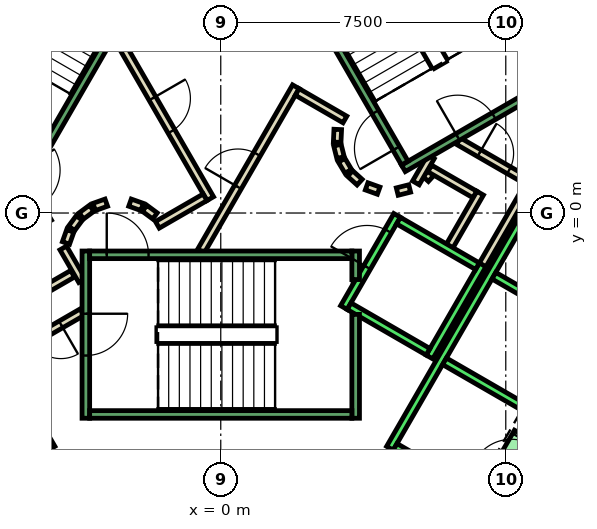
"""IFC4 building model, lengths in metres.
Left out: names, types, materials, properties, quantities, classifications, styles, units other than length and angle.
Written with IfcOpenShell. Run it as: python <this file> out.ifc"""

import sys

from ifc_helpers import new_model, si_unit, direction, frame, frame_2d, origin, place, context, subcontext, project, spatial, polyline, rectangle, outline, extrude, element, fill, save


model = new_model("IFC4")
c1 = context("Model", 3, precision=1e-05, world=origin(), true_north=direction((0.0, 1.0)))
c2 = subcontext(c1, "Body", "Model", "MODEL_VIEW")
j1 = project(units=[si_unit("LENGTHUNIT", "METRE"), si_unit("PLANEANGLEUNIT", "RADIAN")], contexts=[c1])
p1 = place(None, origin())
s1 = spatial("IfcSite", under=j1, at=p1, CompositionType="ELEMENT")
p2 = place(p1, origin())
s2 = spatial("IfcBuilding", under=s1, at=p2, CompositionType="ELEMENT")
p3 = place(p2, frame((0.0, 0.0, 68.6)))
s3 = spatial("IfcBuildingStorey", under=s2, at=p3, CompositionType="ELEMENT", Elevation=68.6)
p4 = place(p3, frame((0.0, 0.0, -0.4)))
e1 = element("IfcWall", 1, at=p4, inside=s3, PredefinedType="SHEAR", context=c2, shape_type="SweptSolid", body=[
    extrude(outline(polyline([(8.517, 11.748), (7.651, 11.248), (12.702, 2.5), (13.856, 2.5), (8.517, 11.748)])), origin(), (0.0, 0.0, 1.0), 4.2),
])
p5 = place(p3, frame((0.0, 0.0, 3.6)))
e2 = element("IfcWall", 2, at=p5, inside=s3, PredefinedType="SHEAR", context=c2, shape_type="SweptSolid", body=[
    extrude(outline(polyline([(8.767, -6.314), (7.902, -5.814), (7.252, -6.94), (8.117, -7.44), (8.767, -6.314)])), origin(), (0.0, 0.0, 1.0), 0.2),
])
p6 = place(p3, frame((5.39, 0.898, 0.0), z_axis=(0.0, 0.0, 1.0), x_axis=(0.673828488714, 0.738887791073, 0.0)))
e3 = element("IfcWall", 3, at=p6, inside=s3, PredefinedType="PARTITIONING", context=c2, shape_type="SweptSolid", body=[
    extrude(rectangle(XDim=0.263, YDim=0.2, at=frame_2d((0.131, 0.0))), origin(), (0.0, 0.0, 1.0), 3.8),
])
p7 = place(p3, frame((5.499, 1.172, 0.0), z_axis=(0.0, 0.0, 1.0), x_axis=(0.866333505267, -0.499465972466, 0.0)))
e4 = element("IfcWall", 4, at=p7, inside=s3, PredefinedType="PARTITIONING", context=c2, shape_type="SweptSolid", body=[
    extrude(rectangle(XDim=1.374, YDim=0.2, at=frame_2d((0.687, 0.0))), origin(), (0.0, 0.0, 1.0), 3.8),
])
p8 = place(p3, frame((6.826, 0.522, 0.0), z_axis=(0.0, 0.0, 1.0), x_axis=(-0.500016722714, -0.866015748706, 0.0)))
e5 = element("IfcWall", 5, at=p8, inside=s3, PredefinedType="PARTITIONING", context=c2, shape_type="SweptSolid", body=[
    extrude(rectangle(XDim=1.7, YDim=0.2, at=frame_2d((0.85, 0.0))), origin(), (0.0, 0.0, 1.0), 3.8),
])
p9 = place(p3, frame((6.25, 1.894, 0.0), z_axis=(0.0, 0.0, 1.0), x_axis=(0.866043184279, -0.499969202016, 0.0)))
e6 = element("IfcWall", 6, at=p9, inside=s3, PredefinedType="PARTITIONING", context=c2, shape_type="SweptSolid", body=[
    extrude(rectangle(XDim=2.084, YDim=0.2, at=frame_2d((1.042, 0.0))), origin(), (0.0, 0.0, 1.0), 3.8),
])
p10 = place(p9, frame((0.642, 0.0, 0.0)))
e7 = element("IfcOpeningElement", 7, at=p10, cuts=e6, PredefinedType="OPENING", context=c2, shape_type="SweptSolid", body=[
    extrude(rectangle(XDim=0.9, YDim=2.1, at=frame_2d((0.45, 1.05))), frame((0.0, 0.11, 0.0), z_axis=(0.0, -1.0, 0.0), x_axis=(1.0, 0.0, 0.0)), (0.0, 0.0, 1.0), 0.22),
])
p11 = place(p3, frame((8.192, 0.888, 0.0), z_axis=(0.0, 0.0, 1.0), x_axis=(-0.499940625693, -0.866059680843, 0.0)))
e8 = element("IfcWall", 8, at=p11, inside=s3, PredefinedType="PARTITIONING", context=c2, shape_type="SweptSolid", body=[
    extrude(rectangle(XDim=2.68, YDim=0.2, at=frame_2d((1.34, 0.0))), origin(), (0.0, 0.0, 1.0), 3.8),
])
p12 = place(p3, frame((5.135, 0.793, 0.0), z_axis=(0.0, 0.0, 1.0), x_axis=(0.499526442893, 0.866298639529, 0.0)))
e9 = element("IfcWall", 9, at=p12, inside=s3, PredefinedType="PARTITIONING", context=c2, shape_type="SweptSolid", body=[
    extrude(rectangle(XDim=0.791, YDim=0.2, at=frame_2d((0.396, 0.0))), origin(), (0.0, 0.0, 1.0), 3.8),
])
p13 = place(p3, frame((-3.9, -1.599, 0.0), z_axis=(0.0, 0.0, 1.0), x_axis=(-0.865969445389, -0.500096910261, 0.0)))
e10 = element("IfcWall", 10, at=p13, inside=s3, PredefinedType="PARTITIONING", context=c2, shape_type="SweptSolid", body=[
    extrude(rectangle(XDim=1.373, YDim=0.2, at=frame_2d((0.687, 0.0))), origin(), (0.0, 0.0, 1.0), 3.8),
])
p14 = place(p3, frame((-3.65, -2.61, 0.0), z_axis=(0.0, 0.0, 1.0), x_axis=(-0.866072462134, -0.499918483688, 0.0)))
e11 = element("IfcWall", 11, at=p14, inside=s3, PredefinedType="PARTITIONING", context=c2, shape_type="SweptSolid", body=[
    extrude(rectangle(XDim=2.084, YDim=0.2, at=frame_2d((1.042, 0.0))), origin(), (0.0, 0.0, 1.0), 3.8),
])
p15 = place(p14, frame((0.642, 0.0, 0.0)))
e12 = element("IfcOpeningElement", 12, at=p15, cuts=e11, PredefinedType="OPENING", context=c2, shape_type="SweptSolid", body=[
    extrude(rectangle(XDim=0.9, YDim=2.1, at=frame_2d((0.45, 1.05))), frame((0.0, 0.11, 0.0), z_axis=(0.0, -1.0, 0.0), x_axis=(1.0, 0.0, 0.0)), (0.0, 0.0, 1.0), 0.22),
])
p16 = place(p3, frame((-4.145, -0.92, 0.0), z_axis=(0.0, 0.0, 1.0), x_axis=(0.499743786207, -0.866173278362, 0.0)))
e13 = element("IfcWall", 13, at=p16, inside=s3, PredefinedType="PARTITIONING", context=c2, shape_type="SweptSolid", body=[
    extrude(rectangle(XDim=0.991, YDim=0.2, at=frame_2d((0.495, 0.0))), origin(), (0.0, 0.0, 1.0), 3.8),
])
p17 = place(p3, frame((-0.52, -1.0, 0.0), z_axis=(0.0, 0.0, 1.0), x_axis=(0.50011622646, 0.865958290007, 0.0)))
e14 = element("IfcWall", 14, at=p17, inside=s3, PredefinedType="PARTITIONING", context=c2, shape_type="SweptSolid", body=[
    extrude(rectangle(XDim=4.991, YDim=0.2, at=frame_2d((2.496, 0.0))), origin(), (0.0, 0.0, 1.0), 3.8),
])
p18 = place(p17, frame((1.945, 0.0, 0.0)))
e15 = element("IfcOpeningElement", 15, at=p18, cuts=e14, PredefinedType="OPENING", context=c2, shape_type="SweptSolid", body=[
    extrude(rectangle(XDim=1.0, YDim=2.1, at=frame_2d((0.5, 1.05))), frame((0.0, 0.11, 0.0), z_axis=(0.0, -1.0, 0.0), x_axis=(1.0, 0.0, 0.0)), (0.0, 0.0, 1.0), 0.22),
])
p19 = place(p3, frame((2.012, 3.186, 0.0), z_axis=(0.0, 0.0, 1.0), x_axis=(0.865891012941, -0.500232699559, 0.0)))
e16 = element("IfcWall", 16, at=p19, inside=s3, PredefinedType="PARTITIONING", context=c2, shape_type="SweptSolid", body=[
    extrude(rectangle(XDim=1.449, YDim=0.2, at=frame_2d((0.725, 0.0))), origin(), (0.0, 0.0, 1.0), 3.8),
])
p20 = place(p3, frame((3.079, 2.199, 0.0), z_axis=(0.0, 0.0, 1.0), x_axis=(-0.047771483479, -0.998858290933, 0.0)))
e17 = element("IfcWall", 17, at=p20, inside=s3, PredefinedType="PARTITIONING", context=c2, shape_type="SweptSolid", body=[
    extrude(rectangle(XDim=0.337, YDim=0.2, at=frame_2d((0.169, 0.0))), origin(), (0.0, 0.0, 1.0), 3.8),
])
p21 = place(p3, frame((3.07, 1.786, 0.0), z_axis=(0.0, 0.0, 1.0), x_axis=(0.242705583207, -0.970099994784, 0.0)))
e18 = element("IfcWall", 18, at=p21, inside=s3, PredefinedType="PARTITIONING", context=c2, shape_type="SweptSolid", body=[
    extrude(rectangle(XDim=0.338, YDim=0.2, at=frame_2d((0.169, 0.0))), origin(), (0.0, 0.0, 1.0), 3.8),
])
for number, where, z_axis, x_axis in (
    (19, (3.182, 1.388, 0.0), (0.0, 0.0, 1.0), (0.512, -0.859, 0.0)),
    (20, (3.404, 1.039, 0.0), (0.0, 0.0, 1.0), (0.74, -0.672, 0.0)),
):
    element("IfcWall", number, at=place(p3, frame(where, z_axis=z_axis, x_axis=x_axis)), inside=s3, PredefinedType="PARTITIONING", context=c2, shape_type="SweptSolid", body=[
        extrude(rectangle(XDim=0.338, YDim=0.2, at=frame_2d((0.169, 0.0))), origin(), (0.0, 0.0, 1.0), 3.8),
    ])
p22 = place(p3, frame((3.838, 0.702, 0.0), z_axis=(0.0, 0.0, 1.0), x_axis=(0.941035081519, -0.338308993895, 0.0)))
e21 = element("IfcWall", 21, at=p22, inside=s3, PredefinedType="PARTITIONING", context=c2, shape_type="SweptSolid", body=[
    extrude(rectangle(XDim=0.337, YDim=0.2, at=frame_2d((0.168, 0.0))), origin(), (0.0, 0.0, 1.0), 3.8),
])
p23 = place(p3, frame((4.644, 0.564, 0.0), z_axis=(0.0, 0.0, 1.0), x_axis=(0.969929076366, 0.243387729394, 0.0)))
e22 = element("IfcWall", 22, at=p23, inside=s3, PredefinedType="PARTITIONING", context=c2, shape_type="SweptSolid", body=[
    extrude(rectangle(XDim=0.337, YDim=0.2, at=frame_2d((0.168, 0.0))), origin(), (0.0, 0.0, 1.0), 3.8),
])
p24 = place(p3, frame((-2.771, 4.7, 0.0), z_axis=(0.0, 0.0, 1.0), x_axis=(0.499969479948, -0.866043023828, 0.0)))
e23 = element("IfcWall", 23, at=p24, inside=s3, PredefinedType="PARTITIONING", context=c2, shape_type="SweptSolid", body=[
    extrude(rectangle(XDim=4.99, YDim=0.2, at=frame_2d((2.495, 0.0))), origin(), (0.0, 0.0, 1.0), 3.8),
])
p25 = place(p24, frame((1.945, 0.0, 0.0)))
e24 = element("IfcOpeningElement", 24, at=p25, cuts=e23, PredefinedType="OPENING", context=c2, shape_type="SweptSolid", body=[
    extrude(rectangle(XDim=1.0, YDim=2.1, at=frame_2d((0.5, 1.05))), frame((0.0, 0.11, 0.0), z_axis=(0.0, -1.0, 0.0), x_axis=(1.0, 0.0, 0.0)), (0.0, 0.0, 1.0), 0.22),
])
p26 = place(p3, frame((-0.412, 0.414, 0.0), z_axis=(0.0, 0.0, 1.0), x_axis=(-0.866017369001, -0.500013916395, 0.0)))
e25 = element("IfcWall", 25, at=p26, inside=s3, PredefinedType="PARTITIONING", context=c2, shape_type="SweptSolid", body=[
    extrude(rectangle(XDim=1.45, YDim=0.2, at=frame_2d((0.725, 0.0))), origin(), (0.0, 0.0, 1.0), 3.8),
])
p27 = place(p3, frame((-1.731, -0.077, 0.0), z_axis=(0.0, 0.0, 1.0), x_axis=(-0.804311165252, 0.594208338422, 0.0)))
e26 = element("IfcWall", 26, at=p27, inside=s3, PredefinedType="PARTITIONING", context=c2, shape_type="SweptSolid", body=[
    extrude(rectangle(XDim=0.338, YDim=0.2, at=frame_2d((0.169, 0.0))), origin(), (0.0, 0.0, 1.0), 3.8),
])
p28 = place(p3, frame((-2.07, 0.16, 0.0), z_axis=(0.0, 0.0, 1.0), x_axis=(-0.942199461132, 0.335052496547, 0.0)))
e27 = element("IfcWall", 27, at=p28, inside=s3, PredefinedType="PARTITIONING", context=c2, shape_type="SweptSolid", body=[
    extrude(rectangle(XDim=0.337, YDim=0.2, at=frame_2d((0.169, 0.0))), origin(), (0.0, 0.0, 1.0), 3.8),
])
p29 = place(p3, frame((-3.012, 0.273, 0.0), z_axis=(0.0, 0.0, 1.0), x_axis=(-0.942280615813, -0.334824194261, 0.0)))
e28 = element("IfcWall", 28, at=p29, inside=s3, PredefinedType="PARTITIONING", context=c2, shape_type="SweptSolid", body=[
    extrude(rectangle(XDim=0.338, YDim=0.2, at=frame_2d((0.169, 0.0))), origin(), (0.0, 0.0, 1.0), 3.8),
])
p30 = place(p3, frame((-3.397, 0.124, 0.0), z_axis=(0.0, 0.0, 1.0), x_axis=(-0.804311165252, -0.594208338422, 0.0)))
e29 = element("IfcWall", 29, at=p30, inside=s3, PredefinedType="PARTITIONING", context=c2, shape_type="SweptSolid", body=[
    extrude(rectangle(XDim=0.338, YDim=0.2, at=frame_2d((0.169, 0.0))), origin(), (0.0, 0.0, 1.0), 3.8),
])
p31 = place(p3, frame((-3.723, -0.131, 0.0), z_axis=(0.0, 0.0, 1.0), x_axis=(-0.594675113454, -0.803966112121, 0.0)))
e30 = element("IfcWall", 30, at=p31, inside=s3, PredefinedType="PARTITIONING", context=c2, shape_type="SweptSolid", body=[
    extrude(rectangle(XDim=0.338, YDim=0.2, at=frame_2d((0.169, 0.0))), origin(), (0.0, 0.0, 1.0), 3.8),
])
p32 = place(p3, frame((-3.96, -0.47, 0.0), z_axis=(0.0, 0.0, 1.0), x_axis=(-0.334824194261, -0.942280615813, 0.0)))
e31 = element("IfcWall", 31, at=p32, inside=s3, PredefinedType="PARTITIONING", context=c2, shape_type="SweptSolid", body=[
    extrude(rectangle(XDim=0.338, YDim=0.2, at=frame_2d((0.169, 0.0))), origin(), (0.0, 0.0, 1.0), 3.8),
])
p33 = place(p3, frame((-9.751, 2.99, 0.0), z_axis=(0.0, 0.0, 1.0), x_axis=(0.50000090737, -0.866024879913, 0.0)))
e32 = element("IfcWall", 32, at=p33, inside=s3, PredefinedType="STANDARD", context=c2, shape_type="SweptSolid", body=[
    extrude(rectangle(XDim=10.6, YDim=0.2, at=frame_2d((5.3, 0.0))), origin(), (0.0, 0.0, 1.0), 3.8),
])
p34 = place(p3, frame((3.24, -2.488, 0.0), z_axis=(0.0, 0.0, 1.0), x_axis=(0.49994636267, 0.866056369097, 0.0)))
e33 = element("IfcWall", 33, at=p34, inside=s3, PredefinedType="STANDARD", context=c2, shape_type="SweptSolid", body=[
    extrude(rectangle(XDim=2.8, YDim=0.2, at=frame_2d((1.4, 0.0))), origin(), (0.0, 0.0, 1.0), 3.8),
])
p35 = place(p34, frame((1.225, 0.0, 0.0)))
e34 = element("IfcOpeningElement", 34, at=p35, cuts=e33, PredefinedType="OPENING", context=c2, shape_type="SweptSolid", body=[
    extrude(rectangle(XDim=1.1, YDim=2.1, at=frame_2d((0.55, 1.05))), frame((0.0, 0.11, 0.0), z_axis=(0.0, -1.0, 0.0), x_axis=(1.0, 0.0, 0.0)), (0.0, 0.0, 1.0), 0.22),
])
p36 = place(p3, frame((5.492, -3.788, 0.0), z_axis=(0.0, 0.0, 1.0), x_axis=(0.500011755427, 0.866018616679, 0.0)))
e35 = element("IfcWall", 35, at=p36, inside=s3, PredefinedType="STANDARD", context=c2, shape_type="SweptSolid", body=[
    extrude(rectangle(XDim=2.8, YDim=0.2, at=frame_2d((1.4, 0.0))), origin(), (0.0, 0.0, 1.0), 3.8),
])
p37 = place(p3, frame((3.377, -2.452, 0.0), z_axis=(0.0, 0.0, 1.0), x_axis=(0.865955154139, -0.50012165622, 0.0)))
e36 = element("IfcWall", 36, at=p37, inside=s3, PredefinedType="STANDARD", context=c2, shape_type="SweptSolid", body=[
    extrude(rectangle(XDim=2.4, YDim=0.2, at=frame_2d((1.2, 0.0))), origin(), (0.0, 0.0, 1.0), 3.8),
])
p38 = place(p3, frame((4.677, -0.2, 0.0), z_axis=(0.0, 0.0, 1.0), x_axis=(0.865973769406, -0.500089422704, 0.0)))
e37 = element("IfcWall", 37, at=p38, inside=s3, PredefinedType="STANDARD", context=c2, shape_type="SweptSolid", body=[
    extrude(rectangle(XDim=2.399, YDim=0.2, at=frame_2d((1.2, 0.0))), origin(), (0.0, 0.0, 1.0), 3.8),
])
p39 = place(p3, frame((4.451, -6.19, 0.0), z_axis=(0.0, 0.0, 1.0), x_axis=(0.50000090737, 0.866024879913, 0.0)))
e38 = element("IfcWall", 38, at=p39, inside=s3, PredefinedType="STANDARD", context=c2, shape_type="SweptSolid", body=[
    extrude(rectangle(XDim=10.6, YDim=0.2, at=frame_2d((5.3, 0.0))), origin(), (0.0, 0.0, 1.0), 3.8),
])
for number, where, z_axis, x_axis in (
    (39, (4.588, -6.153, 0.0), (0.0, 0.0, 1.0), (0.866, -0.5, 0.0)),
    (40, (5.888, -3.902, 0.0), (0.0, 0.0, 1.0), (0.866, -0.5, 0.0)),
    (41, (7.188, -1.65, 0.0), (0.0, 0.0, 1.0), (0.866, -0.5, 0.0)),
):
    element("IfcWall", number, at=place(p3, frame(where, z_axis=z_axis, x_axis=x_axis)), inside=s3, PredefinedType="STANDARD", context=c2, shape_type="SweptSolid", body=[
        extrude(rectangle(XDim=2.5, YDim=0.2, at=frame_2d((1.25, 0.0))), origin(), (0.0, 0.0, 1.0), 3.8),
    ])
p40 = place(p3, frame((7.598, -7.14, 0.0), z_axis=(0.0, 0.0, 1.0), x_axis=(0.500362116554, 0.865816234728, 0.0)))
e42 = element("IfcWall", 42, at=p40, inside=s3, PredefinedType="STANDARD", context=c2, shape_type="SweptSolid", body=[
    extrude(rectangle(XDim=1.299, YDim=1.2, at=frame_2d((0.65, 0.0))), origin(), (0.0, 0.0, 1.0), 2.4),
])
p41 = place(p40, frame((0.1, 0.0, 0.0)))
e43 = element("IfcOpeningElement", 43, at=p41, cuts=e42, PredefinedType="OPENING", context=c2, shape_type="SweptSolid", body=[
    extrude(rectangle(XDim=1.1, YDim=2.3, at=frame_2d((0.55, 1.15))), frame((0.0, 0.61, 0.0), z_axis=(0.0, -1.0, 0.0), x_axis=(1.0, 0.0, 0.0)), (0.0, 0.0, 1.0), 1.22),
])
p42 = place(p3, frame((-3.55, -1.0, 0.0), z_axis=(0.0, 0.0, 1.0), x_axis=(0.0, -1.0, 0.0)))
e44 = element("IfcWall", 44, at=p42, inside=s3, PredefinedType="STANDARD", context=c2, shape_type="SweptSolid", body=[
    extrude(rectangle(XDim=4.4, YDim=0.2, at=frame_2d((2.2, 0.0))), origin(), (0.0, 0.0, 1.0), 3.8),
])
p43 = place(p42, frame((1.65, 0.0, 0.0)))
e45 = element("IfcOpeningElement", 45, at=p43, cuts=e44, PredefinedType="OPENING", context=c2, shape_type="SweptSolid", body=[
    extrude(rectangle(XDim=1.1, YDim=2.2, at=frame_2d((0.55, 1.1))), frame((0.0, 0.11, 0.0), z_axis=(0.0, -1.0, 0.0), x_axis=(1.0, 0.0, 0.0)), (0.0, 0.0, 1.0), 0.22),
])
p44 = place(p3, frame((3.55, -2.667, 0.0), z_axis=(0.0, 0.0, 1.0), x_axis=(0.0, -1.0, 0.0)))
e46 = element("IfcWall", 46, at=p44, inside=s3, PredefinedType="STANDARD", context=c2, shape_type="SweptSolid", body=[
    extrude(rectangle(XDim=2.733, YDim=0.2, at=frame_2d((1.366, 0.0))), origin(), (0.0, 0.0, 1.0), 3.8),
])
p45 = place(p3, frame((3.55, -1.0, 0.0), z_axis=(0.0, 0.0, 1.0), x_axis=(0.0, -1.0, 0.0)))
e47 = element("IfcWall", 47, at=p45, inside=s3, PredefinedType="STANDARD", context=c2, shape_type="SweptSolid", body=[
    extrude(rectangle(XDim=0.751, YDim=0.2, at=frame_2d((0.375, 0.0))), origin(), (0.0, 0.0, 1.0), 3.8),
])
p46 = place(p3, frame((-3.45, -1.1, 0.0), z_axis=(0.0, 0.0, 1.0), x_axis=(1.0, 0.0, 0.0)))
e48 = element("IfcWall", 48, at=p46, inside=s3, PredefinedType="STANDARD", context=c2, shape_type="SweptSolid", body=[
    extrude(rectangle(XDim=6.9, YDim=0.2, at=frame_2d((3.45, 0.0))), origin(), (0.0, 0.0, 1.0), 3.8),
])
p47 = place(p46, frame((0.45, 0.0, 0.0)))
e49 = element("IfcOpeningElement", 49, at=p47, cuts=e48, PredefinedType="OPENING", context=c2, shape_type="SweptSolid", body=[
    extrude(rectangle(XDim=1.1, YDim=2.2, at=frame_2d((0.55, 1.1))), frame((0.0, 0.11, 0.0), z_axis=(0.0, -1.0, 0.0), x_axis=(1.0, 0.0, 0.0)), (0.0, 0.0, 1.0), 0.22),
])
p48 = place(p3, frame((-3.45, -5.3, 0.0), z_axis=(0.0, 0.0, 1.0), x_axis=(1.0, 0.0, 0.0)))
e50 = element("IfcWall", 50, at=p48, inside=s3, PredefinedType="STANDARD", context=c2, shape_type="SweptSolid", body=[
    extrude(rectangle(XDim=6.9, YDim=0.2, at=frame_2d((3.45, 0.0))), origin(), (0.0, 0.0, 1.0), 3.8),
])
p49 = place(p3, frame((4.806, 1.176, 0.0), z_axis=(0.0, 0.0, 1.0), x_axis=(0.866059941101, 0.499940174841, 0.0)))
e51 = element("IfcWall", 51, at=p49, inside=s3, PredefinedType="STANDARD", context=c2, shape_type="SweptSolid", body=[
    extrude(rectangle(XDim=4.4, YDim=0.2, at=frame_2d((2.2, 0.0))), origin(), (0.0, 0.0, 1.0), 3.8),
])
p50 = place(p49, frame((1.65, 0.0, 0.0)))
e52 = element("IfcOpeningElement", 52, at=p50, cuts=e51, PredefinedType="OPENING", context=c2, shape_type="SweptSolid", body=[
    extrude(rectangle(XDim=1.1, YDim=2.2, at=frame_2d((0.55, 1.1))), frame((0.0, 0.11, 0.0), z_axis=(0.0, -1.0, 0.0), x_axis=(1.0, 0.0, 0.0)), (0.0, 0.0, 1.0), 0.22),
])
p51 = place(p3, frame((4.843, 1.312, 0.0), z_axis=(0.0, 0.0, 1.0), x_axis=(-0.499963383562, 0.866046543262, 0.0)))
e53 = element("IfcWall", 53, at=p51, inside=s3, PredefinedType="STANDARD", context=c2, shape_type="SweptSolid", body=[
    extrude(rectangle(XDim=6.9, YDim=0.2, at=frame_2d((3.45, 0.0))), origin(), (0.0, 0.0, 1.0), 3.8),
])
p52 = place(p51, frame((0.45, 0.0, 0.0)))
e54 = element("IfcOpeningElement", 54, at=p52, cuts=e53, PredefinedType="OPENING", context=c2, shape_type="SweptSolid", body=[
    extrude(rectangle(XDim=1.1, YDim=2.2, at=frame_2d((0.55, 1.1))), frame((0.0, 0.11, 0.0), z_axis=(0.0, -1.0, 0.0), x_axis=(1.0, 0.0, 0.0)), (0.0, 0.0, 1.0), 0.22),
])
p53 = place(p3, frame((8.48, 3.412, 0.0), z_axis=(0.0, 0.0, 1.0), x_axis=(-0.499978703459, 0.866037698999, 0.0)))
e55 = element("IfcWall", 55, at=p53, inside=s3, PredefinedType="STANDARD", context=c2, shape_type="SweptSolid", body=[
    extrude(rectangle(XDim=6.9, YDim=0.2, at=frame_2d((3.45, 0.0))), origin(), (0.0, 0.0, 1.0), 3.8),
])
p54 = place(p3, frame((-1.393, 7.288, 0.0), z_axis=(0.0, 0.0, 1.0), x_axis=(-0.499963383562, -0.866046543262, 0.0)))
e56 = element("IfcWall", 56, at=p54, inside=s3, PredefinedType="STANDARD", context=c2, shape_type="SweptSolid", body=[
    extrude(rectangle(XDim=6.9, YDim=0.2, at=frame_2d((3.45, 0.0))), origin(), (0.0, 0.0, 1.0), 3.8),
])
p55 = place(p54, frame((0.45, 0.0, 0.0)))
e57 = element("IfcOpeningElement", 57, at=p55, cuts=e56, PredefinedType="OPENING", context=c2, shape_type="SweptSolid", body=[
    extrude(rectangle(XDim=1.1, YDim=2.2, at=frame_2d((0.55, 1.1))), frame((0.0, 0.11, 0.0), z_axis=(0.0, -1.0, 0.0), x_axis=(1.0, 0.0, 0.0)), (0.0, 0.0, 1.0), 0.22),
])
p56 = place(p18, origin())
e58 = element("IfcDoor", 58, at=p56, inside=s3, OperationType="SINGLE_SWING_LEFT", PredefinedType="DOOR", context=c2, shape_type="SweptSolid", body=[
    extrude(rectangle(XDim=1.0, YDim=2.1, at=frame_2d((0.5, 1.05))), frame((0.0, 0.025, 0.0), z_axis=(0.0, -1.0, 0.0), x_axis=(1.0, 0.0, 0.0)), (0.0, 0.0, 1.0), 0.05),
])
fill(e15, e58)
p57 = place(p25, origin())
e59 = element("IfcDoor", 59, at=p57, inside=s3, OperationType="SINGLE_SWING_RIGHT", PredefinedType="DOOR", context=c2, shape_type="SweptSolid", body=[
    extrude(rectangle(XDim=1.0, YDim=2.1, at=frame_2d((0.5, 1.05))), frame((0.0, 0.025, 0.0), z_axis=(0.0, -1.0, 0.0), x_axis=(1.0, 0.0, 0.0)), (0.0, 0.0, 1.0), 0.05),
])
fill(e24, e59)
p58 = place(p10, origin())
e60 = element("IfcDoor", 60, at=p58, inside=s3, OperationType="SINGLE_SWING_LEFT", PredefinedType="DOOR", context=c2, shape_type="SweptSolid", body=[
    extrude(rectangle(XDim=0.9, YDim=2.1, at=frame_2d((0.45, 1.05))), frame((0.0, 0.025, 0.0), z_axis=(0.0, -1.0, 0.0), x_axis=(1.0, 0.0, 0.0)), (0.0, 0.0, 1.0), 0.05),
])
fill(e7, e60)
p59 = place(p15, origin())
e61 = element("IfcDoor", 61, at=p59, inside=s3, OperationType="SINGLE_SWING_LEFT", PredefinedType="DOOR", context=c2, shape_type="SweptSolid", body=[
    extrude(rectangle(XDim=0.9, YDim=2.1, at=frame_2d((0.45, 1.05))), frame((0.0, 0.025, 0.0), z_axis=(0.0, -1.0, 0.0), x_axis=(1.0, 0.0, 0.0)), (0.0, 0.0, 1.0), 0.05),
])
fill(e12, e61)
p60 = place(p41, origin())
e62 = element("IfcDoor", 62, at=p60, inside=s3, OperationType="SLIDING_TO_LEFT", PredefinedType="DOOR", context=c2, shape_type="SweptSolid", body=[
    extrude(rectangle(XDim=1.1, YDim=2.3, at=frame_2d((0.55, 1.15))), frame((0.0, 0.025, 0.0), z_axis=(0.0, -1.0, 0.0), x_axis=(1.0, 0.0, 0.0)), (0.0, 0.0, 1.0), 0.05),
])
fill(e43, e62)
p61 = place(p35, origin())
e63 = element("IfcDoor", 63, at=p61, inside=s3, OperationType="SLIDING_TO_LEFT", PredefinedType="DOOR", context=c2, shape_type="SweptSolid", body=[
    extrude(rectangle(XDim=1.1, YDim=2.1, at=frame_2d((0.55, 1.05))), frame((0.0, 0.025, 0.0), z_axis=(0.0, -1.0, 0.0), x_axis=(1.0, 0.0, 0.0)), (0.0, 0.0, 1.0), 0.05),
])
fill(e34, e63)
p62 = place(p47, origin())
e64 = element("IfcDoor", 64, at=p62, inside=s3, OperationType="SINGLE_SWING_LEFT", PredefinedType="DOOR", context=c2, shape_type="SweptSolid", body=[
    extrude(rectangle(XDim=1.1, YDim=2.2, at=frame_2d((0.55, 1.1))), frame((0.0, 0.025, 0.0), z_axis=(0.0, -1.0, 0.0), x_axis=(1.0, 0.0, 0.0)), (0.0, 0.0, 1.0), 0.05),
])
fill(e49, e64)
p63 = place(p43, origin())
e65 = element("IfcDoor", 65, at=p63, inside=s3, OperationType="SINGLE_SWING_LEFT", PredefinedType="DOOR", context=c2, shape_type="SweptSolid", body=[
    extrude(rectangle(XDim=1.1, YDim=2.2, at=frame_2d((0.55, 1.1))), frame((0.0, 0.025, 0.0), z_axis=(0.0, -1.0, 0.0), x_axis=(1.0, 0.0, 0.0)), (0.0, 0.0, 1.0), 0.05),
])
fill(e45, e65)
p64 = place(p52, origin())
e66 = element("IfcDoor", 66, at=p64, inside=s3, OperationType="SINGLE_SWING_LEFT", PredefinedType="DOOR", context=c2, shape_type="SweptSolid", body=[
    extrude(rectangle(XDim=1.1, YDim=2.2, at=frame_2d((0.55, 1.1))), frame((0.0, 0.025, 0.0), z_axis=(0.0, -1.0, 0.0), x_axis=(1.0, 0.0, 0.0)), (0.0, 0.0, 1.0), 0.05),
])
fill(e54, e66)
p65 = place(p50, origin())
e67 = element("IfcDoor", 67, at=p65, inside=s3, OperationType="SINGLE_SWING_LEFT", PredefinedType="DOOR", context=c2, shape_type="SweptSolid", body=[
    extrude(rectangle(XDim=1.1, YDim=2.2, at=frame_2d((0.55, 1.1))), frame((0.0, 0.025, 0.0), z_axis=(0.0, -1.0, 0.0), x_axis=(1.0, 0.0, 0.0)), (0.0, 0.0, 1.0), 0.05),
])
fill(e52, e67)
save(model, sys.argv[1])
